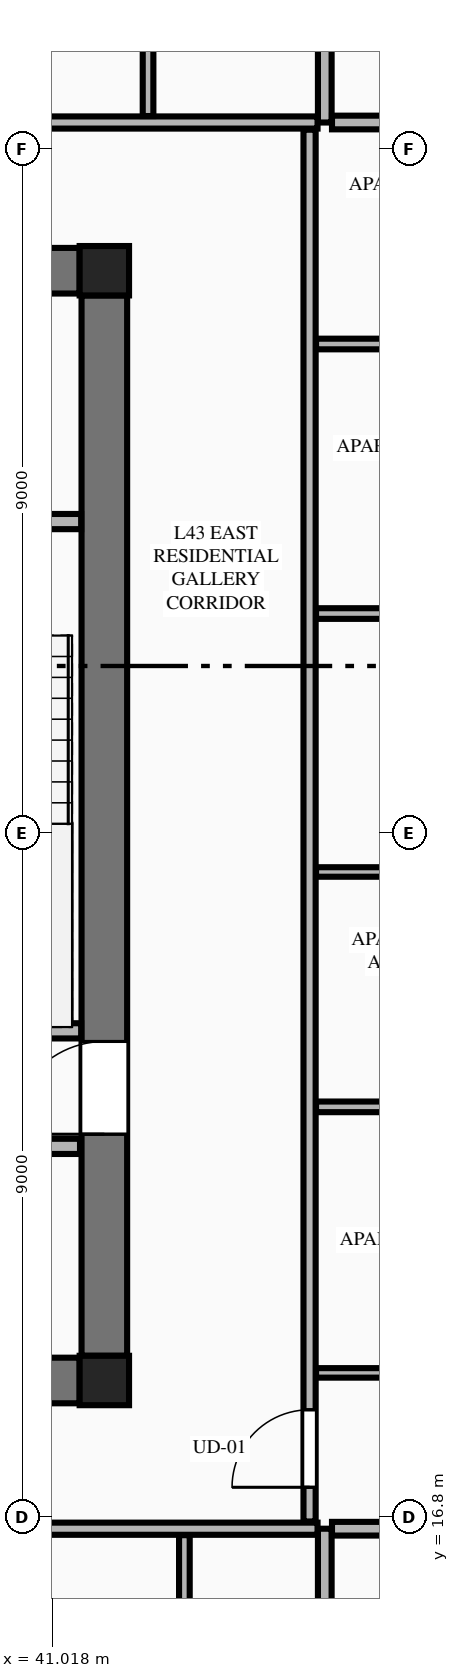
"""IFC4 building model, lengths in metres.
Left out: names, types, materials, properties, quantities, classifications, styles, units other than length and angle.
Written with IfcOpenShell. Run it as: python <this file> out.ifc"""

import sys

from ifc_helpers import new_model, si_unit, direction, frame, frame_2d, origin, origin_2d, place, context, subcontext, project, spatial, rectangle, extrude, element, fill, save


model = new_model("IFC4")
c1 = context("Model", 3, precision=1e-05, world=origin(), true_north=direction((0.0, 1.0)))
c2 = subcontext(c1, "Body", "Model", "MODEL_VIEW")
j1 = project(units=[si_unit("LENGTHUNIT", "METRE"), si_unit("PLANEANGLEUNIT", "RADIAN")], contexts=[c1])
p1 = place(None, origin())
s1 = spatial("IfcSite", under=j1, at=p1, CompositionType="ELEMENT")
p2 = place(p1, origin())
s2 = spatial("IfcBuilding", under=s1, at=p2, CompositionType="ELEMENT")
p3 = place(p2, frame((0.0, 0.0, 164.15)))
s3 = spatial("IfcBuildingStorey", under=s2, at=p3, CompositionType="ELEMENT", Elevation=164.15)
for number, where, z_axis, x_axis in (
    (1, (41.7, 18.6, 0.0), (0.0, 0.0, 1.0), (1.0, 0.0, 0.0)),
    (2, (41.7, 33.2, 0.0), (0.0, 0.0, 1.0), (1.0, 0.0, 0.0)),
):
    element("IfcColumn", number, at=place(p3, frame(where, z_axis=z_axis, x_axis=x_axis)), inside=s3, PredefinedType="COLUMN", context=c2, shape_type="SweptSolid", body=[
        extrude(rectangle(XDim=0.65, YDim=0.65, at=origin_2d()), origin(), (0.0, 0.0, 1.0), 3.55),
    ])
for number, where, z_axis, x_axis in (
    (3, (23.425, 18.6, 0.0), (0.0, 0.0, 1.0), (1.0, 0.0, 0.0)),
    (4, (23.425, 33.2, 0.0), (0.0, 0.0, 1.0), (1.0, 0.0, 0.0)),
):
    element("IfcWall", number, at=place(p3, frame(where, z_axis=z_axis, x_axis=x_axis)), inside=s3, PredefinedType="SHEAR", context=c2, shape_type="SweptSolid", body=[
        extrude(rectangle(XDim=17.95, YDim=0.6, at=frame_2d((8.975, 0.0))), origin(), (0.0, 0.0, 1.0), 3.34),
    ])
p4 = place(p3, frame((41.7, 18.925, 0.0), z_axis=(0.0, 0.0, 1.0), x_axis=(0.0, 1.0, 0.0)))
e5 = element("IfcWall", 5, at=p4, inside=s3, PredefinedType="SHEAR", context=c2, shape_type="SweptSolid", body=[
    extrude(rectangle(XDim=13.95, YDim=0.6, at=frame_2d((6.975, 0.0))), origin(), (0.0, 0.0, 1.0), 3.34),
])
p5 = place(p4, frame((2.915, 0.0, 0.0)))
e6 = element("IfcOpeningElement", 6, at=p5, cuts=e5, PredefinedType="OPENING", context=c2, shape_type="SweptSolid", body=[
    extrude(rectangle(XDim=1.22, YDim=2.25, at=frame_2d((0.61, 1.125))), frame((0.0, 0.31, 0.0), z_axis=(0.0, -1.0, 0.0), x_axis=(1.0, 0.0, 0.0)), (0.0, 0.0, 1.0), 0.62),
])
p6 = place(p3, frame((38.125, 23.2, 0.0), z_axis=(0.0, 0.0, 1.0), x_axis=(1.0, 0.0, 0.0)))
e7 = element("IfcWall", 7, at=p6, inside=s3, PredefinedType="PLUMBINGWALL", context=c2, shape_type="SweptSolid", body=[
    extrude(rectangle(XDim=3.27, YDim=0.2, at=frame_2d((1.635, 0.0))), origin(), (0.0, 0.0, 1.0), 3.34),
])
p7 = place(p3, frame((38.125, 29.9, 0.0), z_axis=(0.0, 0.0, 1.0), x_axis=(1.0, 0.0, 0.0)))
e8 = element("IfcWall", 8, at=p7, inside=s3, PredefinedType="PLUMBINGWALL", context=c2, shape_type="SweptSolid", body=[
    extrude(rectangle(XDim=3.27, YDim=0.2, at=frame_2d((1.635, 0.0))), origin(), (0.0, 0.0, 1.0), 3.34),
])
p8 = place(p7, frame((0.5, 0.0, 0.0)))
e9 = element("IfcOpeningElement", 9, at=p8, cuts=e8, PredefinedType="OPENING", context=c2, shape_type="SweptSolid", body=[
    extrude(rectangle(XDim=0.85, YDim=2.05, at=frame_2d((0.425, 1.025))), frame((0.0, 0.11, 0.0), z_axis=(0.0, -1.0, 0.0), x_axis=(1.0, 0.0, 0.0)), (0.0, 0.0, 1.0), 0.22),
])
p9 = place(p3, frame((23.42, 21.68, 0.0), z_axis=(0.0, 0.0, 1.0), x_axis=(1.0, 0.0, 0.0)))
e10 = element("IfcWall", 10, at=p9, inside=s3, PredefinedType="PLUMBINGWALL", context=c2, shape_type="SweptSolid", body=[
    extrude(rectangle(XDim=17.96, YDim=0.2, at=frame_2d((8.98, 0.0))), origin(), (0.0, 0.0, 1.0), 3.34),
])
p10 = place(p9, frame((11.6, 0.0, 0.0)))
e11 = element("IfcOpeningElement", 11, at=p10, cuts=e10, PredefinedType="OPENING", context=c2, shape_type="SweptSolid", body=[
    extrude(rectangle(XDim=1.1, YDim=2.2, at=frame_2d((0.55, 1.1))), frame((0.0, 0.11, 0.0), z_axis=(0.0, -1.0, 0.0), x_axis=(1.0, 0.0, 0.0)), (0.0, 0.0, 1.0), 0.22),
])
p11 = place(p9, frame((0.41, 0.0, 0.0)))
e12 = element("IfcOpeningElement", 12, at=p11, cuts=e10, PredefinedType="OPENING", context=c2, shape_type="SweptSolid", body=[
    extrude(rectangle(XDim=0.85, YDim=2.05, at=frame_2d((0.425, 1.025))), frame((0.0, 0.11, 0.0), z_axis=(0.0, -1.0, 0.0), x_axis=(1.0, 0.0, 0.0)), (0.0, 0.0, 1.0), 0.22),
])
p12 = place(p9, frame((4.13, 0.0, 0.0)))
e13 = element("IfcOpeningElement", 13, at=p12, cuts=e10, PredefinedType="OPENING", context=c2, shape_type="SweptSolid", body=[
    extrude(rectangle(XDim=0.85, YDim=2.05, at=frame_2d((0.425, 1.025))), frame((0.0, 0.11, 0.0), z_axis=(0.0, -1.0, 0.0), x_axis=(1.0, 0.0, 0.0)), (0.0, 0.0, 1.0), 0.22),
])
p13 = place(p9, frame((7.83, 0.0, 0.0)))
e14 = element("IfcOpeningElement", 14, at=p13, cuts=e10, PredefinedType="OPENING", context=c2, shape_type="SweptSolid", body=[
    extrude(rectangle(XDim=0.85, YDim=2.05, at=frame_2d((0.425, 1.025))), frame((0.0, 0.11, 0.0), z_axis=(0.0, -1.0, 0.0), x_axis=(1.0, 0.0, 0.0)), (0.0, 0.0, 1.0), 0.22),
])
p14 = place(p9, frame((13.78, 0.0, 0.0)))
e15 = element("IfcOpeningElement", 15, at=p14, cuts=e10, PredefinedType="OPENING", context=c2, shape_type="SweptSolid", body=[
    extrude(rectangle(XDim=0.85, YDim=2.05, at=frame_2d((0.425, 1.025))), frame((0.0, 0.11, 0.0), z_axis=(0.0, -1.0, 0.0), x_axis=(1.0, 0.0, 0.0)), (0.0, 0.0, 1.0), 0.22),
])
p15 = place(p9, frame((16.13, 0.0, 0.0)))
e16 = element("IfcOpeningElement", 16, at=p15, cuts=e10, PredefinedType="OPENING", context=c2, shape_type="SweptSolid", body=[
    extrude(rectangle(XDim=0.85, YDim=2.05, at=frame_2d((0.425, 1.025))), frame((0.0, 0.11, 0.0), z_axis=(0.0, -1.0, 0.0), x_axis=(1.0, 0.0, 0.0)), (0.0, 0.0, 1.0), 0.22),
])
p16 = place(p3, frame((44.6, 4.105, 0.0), z_axis=(0.0, 0.0, 1.0), x_axis=(0.0, 1.0, 0.0)))
e17 = element("IfcWall", 17, at=p16, inside=s3, PredefinedType="PARTITIONING", context=c2, shape_type="SweptSolid", body=[
    extrude(rectangle(XDim=12.545, YDim=0.18, at=frame_2d((6.272, 0.0))), origin(), (0.0, 0.0, 1.0), 3.34),
])
p17 = place(p3, frame((20.295, 16.65, 0.0), z_axis=(0.0, 0.0, 1.0), x_axis=(1.0, 0.0, 0.0)))
e18 = element("IfcWall", 18, at=p17, inside=s3, PredefinedType="PARTITIONING", context=c2, shape_type="SweptSolid", body=[
    extrude(rectangle(XDim=24.21, YDim=0.16, at=frame_2d((12.105, 0.0))), origin(), (0.0, 0.0, 1.0), 3.34),
])
p18 = place(p17, frame((0.405, 0.0, 0.0)))
e19 = element("IfcOpeningElement", 19, at=p18, cuts=e18, PredefinedType="OPENING", context=c2, shape_type="SweptSolid", body=[
    extrude(rectangle(XDim=1.35, YDim=2.35, at=frame_2d((0.675, 1.175))), frame((0.0, 0.09, 0.0), z_axis=(0.0, -1.0, 0.0), x_axis=(1.0, 0.0, 0.0)), (0.0, 0.0, 1.0), 0.18),
])
p19 = place(p3, frame((42.753, 11.592, 0.0), z_axis=(0.0, 0.0, 1.0), x_axis=(0.0, 1.0, 0.0)))
e20 = element("IfcWall", 20, at=p19, inside=s3, PredefinedType="PLUMBINGWALL", context=c2, shape_type="SweptSolid", body=[
    extrude(rectangle(XDim=4.973, YDim=0.14, at=frame_2d((2.486, 0.0))), origin(), (0.0, 0.0, 1.0), 2.722),
])
p20 = place(p3, frame((44.6, 35.15, 0.0), z_axis=(0.0, 0.0, 1.0), x_axis=(0.0, 1.0, 0.0)))
e21 = element("IfcWall", 21, at=p20, inside=s3, PredefinedType="PARTITIONING", context=c2, shape_type="SweptSolid", body=[
    extrude(rectangle(XDim=12.345, YDim=0.18, at=frame_2d((6.173, 0.0))), origin(), (0.0, 0.0, 1.0), 3.34),
])
p21 = place(p3, frame((20.295, 35.15, 0.0), z_axis=(0.0, 0.0, 1.0), x_axis=(1.0, 0.0, 0.0)))
e22 = element("IfcWall", 22, at=p21, inside=s3, PredefinedType="PARTITIONING", context=c2, shape_type="SweptSolid", body=[
    extrude(rectangle(XDim=24.21, YDim=0.16, at=frame_2d((12.105, 0.0))), origin(), (0.0, 0.0, 1.0), 3.34),
])
p22 = place(p21, frame((0.405, 0.0, 0.0)))
e23 = element("IfcOpeningElement", 23, at=p22, cuts=e22, PredefinedType="OPENING", context=c2, shape_type="SweptSolid", body=[
    extrude(rectangle(XDim=1.35, YDim=2.35, at=frame_2d((0.675, 1.175))), frame((0.0, 0.09, 0.0), z_axis=(0.0, -1.0, 0.0), x_axis=(1.0, 0.0, 0.0)), (0.0, 0.0, 1.0), 0.18),
])
p23 = place(p3, frame((42.275, 35.235, 0.0), z_axis=(0.0, 0.0, 1.0), x_axis=(0.0, 1.0, 0.0)))
e24 = element("IfcWall", 24, at=p23, inside=s3, PredefinedType="PLUMBINGWALL", context=c2, shape_type="SweptSolid", body=[
    extrude(rectangle(XDim=5.262, YDim=0.14, at=frame_2d((2.631, 0.0))), origin(), (0.0, 0.0, 1.0), 2.722),
])
p24 = place(p3, frame((44.695, 16.65, 0.0), z_axis=(0.0, 0.0, 1.0), x_axis=(1.0, 0.0, 0.0)))
e25 = element("IfcWall", 25, at=p24, inside=s3, PredefinedType="PARTITIONING", context=c2, shape_type="SweptSolid", body=[
    extrude(rectangle(XDim=7.996, YDim=0.18, at=frame_2d((3.998, 0.0))), origin(), (0.0, 0.0, 1.0), 3.34),
])
p25 = place(p3, frame((44.695, 35.15, 0.0), z_axis=(0.0, 0.0, 1.0), x_axis=(1.0, 0.0, 0.0)))
e26 = element("IfcWall", 26, at=p25, inside=s3, PredefinedType="PARTITIONING", context=c2, shape_type="SweptSolid", body=[
    extrude(rectangle(XDim=7.895, YDim=0.18, at=frame_2d((3.948, 0.0))), origin(), (0.0, 0.0, 1.0), 3.34),
])
p26 = place(p3, frame((44.4, 16.745, 0.0), z_axis=(0.0, 0.0, 1.0), x_axis=(0.0, 1.0, 0.0)))
e27 = element("IfcWall", 27, at=p26, inside=s3, PredefinedType="PARTITIONING", context=c2, shape_type="SweptSolid", body=[
    extrude(rectangle(XDim=18.31, YDim=0.16, at=frame_2d((9.155, 0.0))), origin(), (0.0, 0.0, 1.0), 3.34),
])
p27 = place(p26, frame((0.45, 0.0, 0.0)))
e28 = element("IfcOpeningElement", 28, at=p27, cuts=e27, PredefinedType="OPENING", context=c2, shape_type="SweptSolid", body=[
    extrude(rectangle(XDim=1.02, YDim=2.25, at=frame_2d((0.51, 1.125))), frame((0.0, 0.09, 0.0), z_axis=(0.0, -1.0, 0.0), x_axis=(1.0, 0.0, 0.0)), (0.0, 0.0, 1.0), 0.18),
])
p28 = place(p3, frame((44.485, 18.7, 0.0), z_axis=(0.0, 0.0, 1.0), x_axis=(1.0, 0.0, 0.0)))
e29 = element("IfcWall", 29, at=p28, inside=s3, PredefinedType="PARTITIONING", context=c2, shape_type="SweptSolid", body=[
    extrude(rectangle(XDim=3.98, YDim=0.125, at=frame_2d((1.99, 0.0))), origin(), (0.0, 0.0, 1.0), 2.722),
])
for number, where, z_axis, x_axis in (
    (30, (44.485, 28.69, 0.0), (0.0, 0.0, 1.0), (1.0, 0.0, 0.0)),
    (31, (44.485, 22.2, 0.0), (0.0, 0.0, 1.0), (1.0, 0.0, 0.0)),
):
    element("IfcWall", number, at=place(p3, frame(where, z_axis=z_axis, x_axis=x_axis)), inside=s3, PredefinedType="PLUMBINGWALL", context=c2, shape_type="SweptSolid", body=[
        extrude(rectangle(XDim=3.98, YDim=0.14, at=frame_2d((1.99, 0.0))), origin(), (0.0, 0.0, 1.0), 3.34),
    ])
p29 = place(p3, frame((44.485, 25.29, 0.0), z_axis=(0.0, 0.0, 1.0), x_axis=(1.0, 0.0, 0.0)))
e32 = element("IfcWall", 32, at=p29, inside=s3, PredefinedType="PARTITIONING", context=c2, shape_type="SweptSolid", body=[
    extrude(rectangle(XDim=3.98, YDim=0.125, at=frame_2d((1.99, 0.0))), origin(), (0.0, 0.0, 1.0), 3.34),
])
p30 = place(p3, frame((44.485, 32.236, 0.0), z_axis=(0.0, 0.0, 1.0), x_axis=(1.0, 0.0, 0.0)))
e33 = element("IfcWall", 33, at=p30, inside=s3, PredefinedType="PLUMBINGWALL", context=c2, shape_type="SweptSolid", body=[
    extrude(rectangle(XDim=3.98, YDim=0.14, at=frame_2d((1.99, 0.0))), origin(), (0.0, 0.0, 1.0), 3.34),
])
p31 = place(p5, origin())
e34 = element("IfcDoor", 34, at=p31, inside=s3, OperationType="SINGLE_SWING_LEFT", PredefinedType="DOOR", context=c2, shape_type="SweptSolid", body=[
    extrude(rectangle(XDim=1.22, YDim=2.25, at=frame_2d((0.61, 1.125))), frame((0.0, 0.025, 0.0), z_axis=(0.0, -1.0, 0.0), x_axis=(1.0, 0.0, 0.0)), (0.0, 0.0, 1.0), 0.05),
])
fill(e6, e34)
p32 = place(p27, origin())
e35 = element("IfcDoor", 35, at=p32, inside=s3, OperationType="SINGLE_SWING_LEFT", PredefinedType="DOOR", context=c2, shape_type="SweptSolid", body=[
    extrude(rectangle(XDim=1.02, YDim=2.25, at=frame_2d((0.51, 1.125))), frame((0.0, 0.025, 0.0), z_axis=(0.0, -1.0, 0.0), x_axis=(1.0, 0.0, 0.0)), (0.0, 0.0, 1.0), 0.05),
])
fill(e28, e35)
save(model, sys.argv[1])
